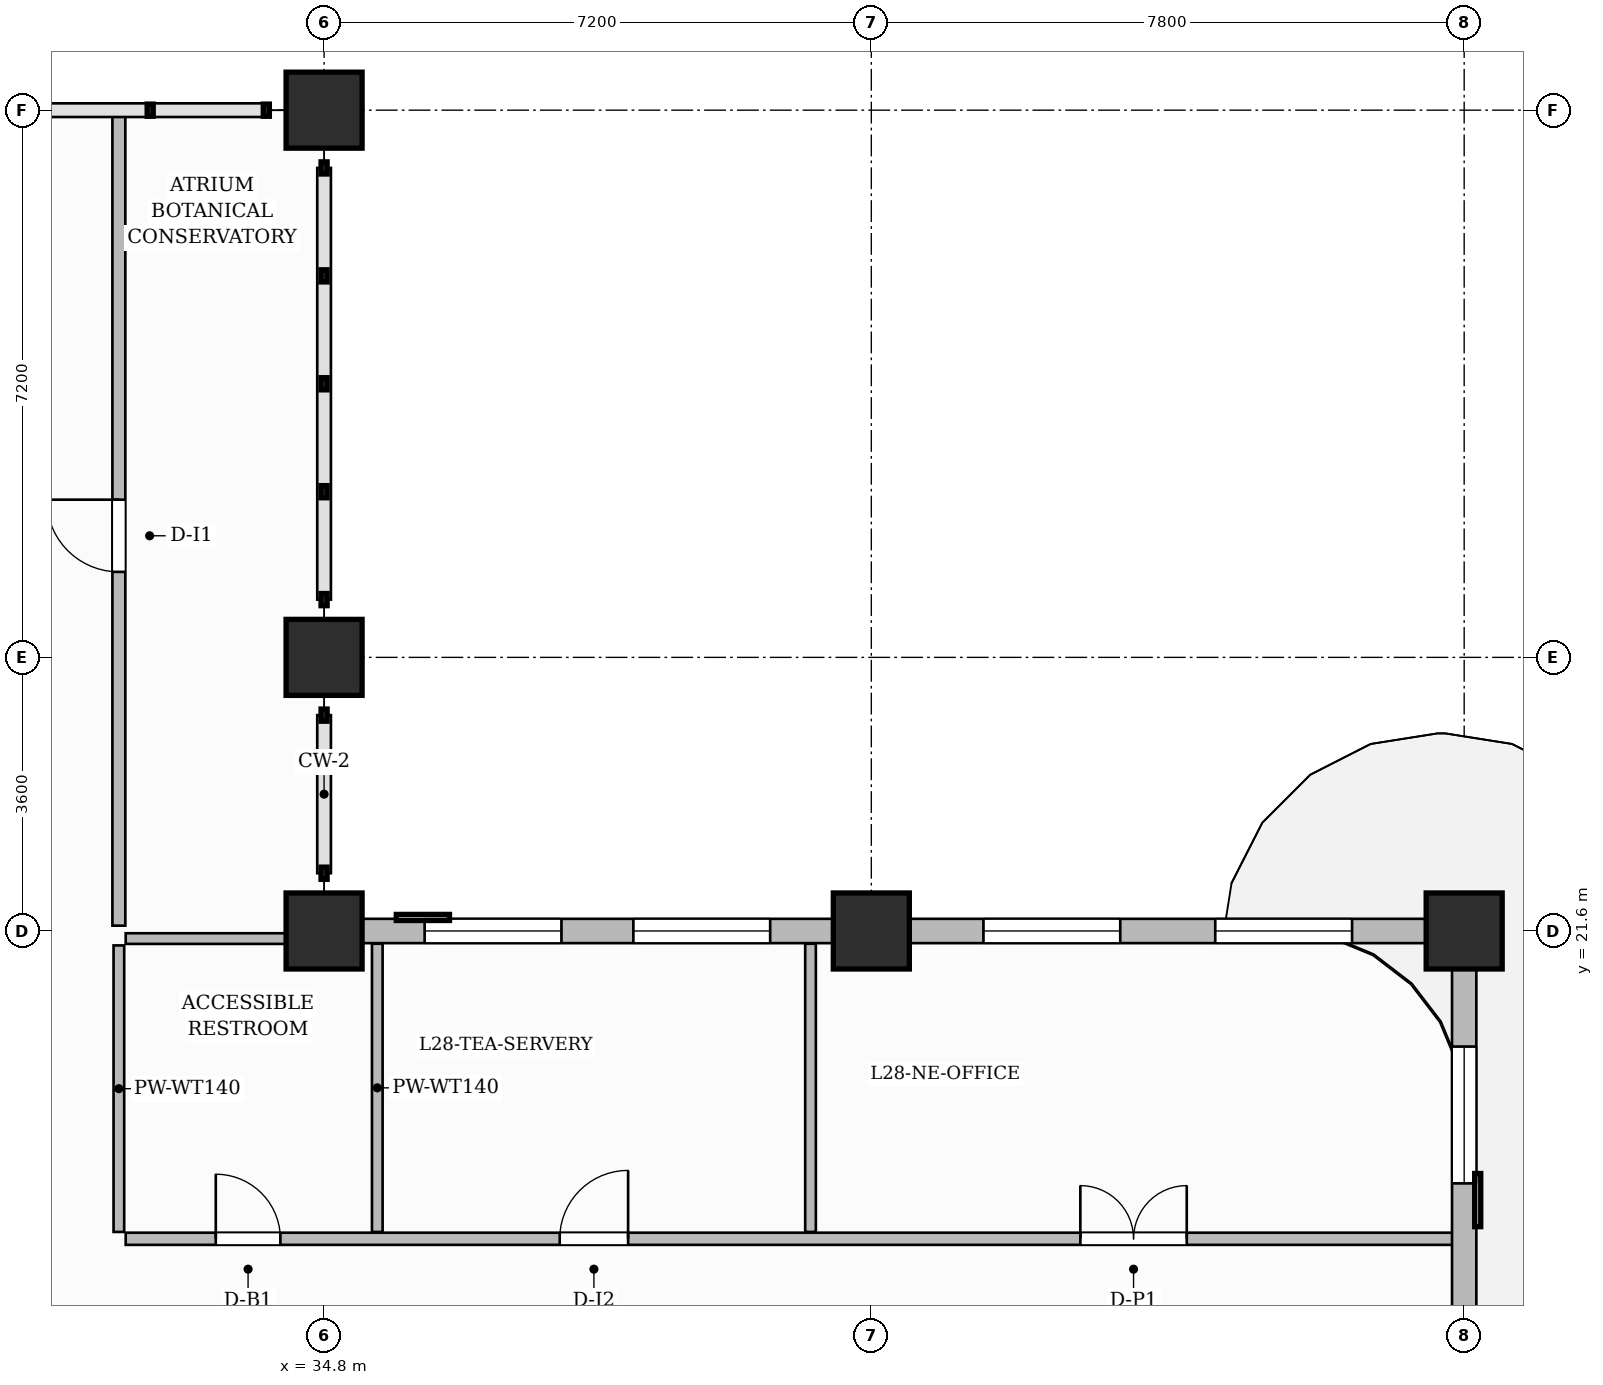
"""IFC4 building model, lengths in metres.
Left out: names, types, materials, properties, quantities, classifications, styles, units other than length and angle.
Written with IfcOpenShell. Run it as: python <this file> out.ifc"""

import sys

from ifc_helpers import new_model, si_unit, direction, frame, frame_2d, origin, origin_2d, place, context, subcontext, project, spatial, rectangle, extrude, source, transform, mapped, element, fill, save


model = new_model("IFC4")
c1 = context("Model", 3, precision=1e-05, world=origin(), true_north=direction((0.0, 1.0)))
c2 = subcontext(c1, "Body", "Model", "MODEL_VIEW")
j1 = project(units=[si_unit("LENGTHUNIT", "METRE"), si_unit("PLANEANGLEUNIT", "RADIAN")], contexts=[c1])
p1 = place(None, origin())
s1 = spatial("IfcSite", under=j1, at=p1, CompositionType="ELEMENT")
p2 = place(p1, origin())
s2 = spatial("IfcBuilding", under=s1, at=p2, CompositionType="ELEMENT")
p3 = place(p2, frame((0.0, 0.0, 115.5)))
s3 = spatial("IfcBuildingStorey", under=s2, at=p3, CompositionType="ELEMENT", Elevation=115.5)
m1 = source(origin(), c2, "Body", "SweptSolid", [
    extrude(rectangle(XDim=1.0, YDim=1.0, at=origin_2d()), origin(), (0.0, 0.0, 1.0), 3.7),
])
for number, where, z_axis, x_axis in (
    (1, (34.8, 21.6, 0.0), (0.0, 0.0, 1.0), (1.0, 0.0, 0.0)),
    (2, (34.8, 25.2, 0.0), (0.0, 0.0, 1.0), (1.0, 0.0, 0.0)),
    (3, (34.8, 32.4, 0.0), (0.0, 0.0, 1.0), (1.0, 0.0, 0.0)),
    (4, (42.0, 21.6, 0.0), (0.0, 0.0, 1.0), (1.0, 0.0, 0.0)),
    (5, (49.8, 21.6, 0.0), (0.0, 0.0, 1.0), (1.0, 0.0, 0.0)),
):
    element("IfcColumn", number, at=place(p3, frame(where, z_axis=z_axis, x_axis=x_axis)), inside=s3, PredefinedType="COLUMN", context=c2, shape_type="MappedRepresentation", body=[
        mapped(m1, transform((0.0, 0.0, 0.0), scale=1.0)),
    ])
p4 = place(p3, frame((32.19, 17.55, 0.0), z_axis=(0.0, 0.0, 1.0), x_axis=(1.0, 0.0, 0.0)))
e6 = element("IfcWall", 6, at=p4, inside=s3, PredefinedType="PARTITIONING", context=c2, shape_type="SweptSolid", body=[
    extrude(rectangle(XDim=17.47, YDim=0.16, at=frame_2d((8.735, 0.0))), origin(), (0.0, 0.0, 1.0), 3.45),
])
p5 = place(p4, frame((1.185, 0.0, 0.0)))
e7 = element("IfcOpeningElement", 7, at=p5, cuts=e6, PredefinedType="OPENING", context=c2, shape_type="SweptSolid", body=[
    extrude(rectangle(XDim=0.85, YDim=2.1, at=frame_2d((0.425, 1.05))), frame((0.0, 0.09, 0.0), z_axis=(0.0, -1.0, 0.0), x_axis=(1.0, 0.0, 0.0)), (0.0, 0.0, 1.0), 0.18),
])
p6 = place(p4, frame((5.71, 0.0, 0.0)))
e8 = element("IfcOpeningElement", 8, at=p6, cuts=e6, PredefinedType="OPENING", context=c2, shape_type="SweptSolid", body=[
    extrude(rectangle(XDim=0.9, YDim=2.15, at=frame_2d((0.45, 1.075))), frame((0.0, 0.09, 0.0), z_axis=(0.0, -1.0, 0.0), x_axis=(1.0, 0.0, 0.0)), (0.0, 0.0, 1.0), 0.18),
])
p7 = place(p4, frame((12.56, 0.0, 0.0)))
e9 = element("IfcOpeningElement", 9, at=p7, cuts=e6, PredefinedType="OPENING", context=c2, shape_type="SweptSolid", body=[
    extrude(rectangle(XDim=1.4, YDim=2.35, at=frame_2d((0.7, 1.175))), frame((0.0, 0.09, 0.0), z_axis=(0.0, -1.0, 0.0), x_axis=(1.0, 0.0, 0.0)), (0.0, 0.0, 1.0), 0.18),
])
p8 = place(p3, frame((32.1, 17.64, 0.0), z_axis=(0.0, 0.0, 1.0), x_axis=(0.0, 1.0, 0.0)))
e10 = element("IfcWall", 10, at=p8, inside=s3, PredefinedType="PARTITIONING", context=c2, shape_type="SweptSolid", body=[
    extrude(rectangle(XDim=3.77, YDim=0.14, at=frame_2d((1.885, 0.0))), origin(), (0.0, 0.0, 1.0), 3.45),
])
for number, where, z_axis, x_axis in (
    (11, (35.5, 17.64, 0.0), (0.0, 0.0, 1.0), (0.0, 1.0, 0.0)),
    (12, (41.2, 17.64, 0.0), (0.0, 0.0, 1.0), (0.0, 1.0, 0.0)),
):
    element("IfcWall", number, at=place(p3, frame(where, z_axis=z_axis, x_axis=x_axis)), inside=s3, PredefinedType="PARTITIONING", context=c2, shape_type="SweptSolid", body=[
        extrude(rectangle(XDim=3.792, YDim=0.14, at=frame_2d((1.896, 0.0))), origin(), (0.0, 0.0, 1.0), 3.45),
    ])
p9 = place(p3, frame((32.19, 21.5, 0.0), z_axis=(0.0, 0.0, 1.0), x_axis=(1.0, 0.0, 0.0)))
e13 = element("IfcWall", 13, at=p9, inside=s3, PredefinedType="PARTITIONING", context=c2, shape_type="SweptSolid", body=[
    extrude(rectangle(XDim=2.42, YDim=0.14, at=frame_2d((1.21, 0.0))), origin(), (0.0, 0.0, 1.0), 2.935),
])
p10 = place(p3, frame((32.1, 21.67, 0.0), z_axis=(0.0, 0.0, 1.0), x_axis=(0.0, 1.0, 0.0)))
e14 = element("IfcWall", 14, at=p10, inside=s3, PredefinedType="PARTITIONING", context=c2, shape_type="SweptSolid", body=[
    extrude(rectangle(XDim=10.702, YDim=0.17, at=frame_2d((5.351, 0.0))), origin(), (0.0, 0.0, 1.0), 3.45),
])
p11 = place(p10, frame((4.655, 0.0, 0.0)))
e15 = element("IfcOpeningElement", 15, at=p11, cuts=e14, PredefinedType="OPENING", context=c2, shape_type="SweptSolid", body=[
    extrude(rectangle(XDim=0.95, YDim=2.15, at=frame_2d((0.475, 1.075))), frame((0.0, 0.095, 0.0), z_axis=(0.0, -1.0, 0.0), x_axis=(1.0, 0.0, 0.0)), (0.0, 0.0, 1.0), 0.19),
])
p12 = place(p3, frame((49.8, 14.62, 0.0), z_axis=(0.0, 0.0, 1.0), x_axis=(0.0, 1.0, 0.0)))
e16 = element("IfcWall", 16, at=p12, inside=s3, PredefinedType="SOLIDWALL", context=c2, shape_type="SweptSolid", body=[
    extrude(rectangle(XDim=6.93, YDim=0.32, at=frame_2d((3.465, 0.0))), origin(), (0.0, 0.0, 1.0), 2.935),
])
p13 = place(p12, frame((0.42, 0.0, 0.0)))
e17 = element("IfcOpeningElement", 17, at=p13, cuts=e16, PredefinedType="OPENING", context=c2, shape_type="SweptSolid", body=[
    extrude(rectangle(XDim=1.2, YDim=2.2, at=frame_2d((0.6, 1.1))), frame((0.0, 0.17, 0.0), z_axis=(0.0, -1.0, 0.0), x_axis=(1.0, 0.0, 0.0)), (0.0, 0.0, 1.0), 0.34),
])
p14 = place(p12, frame((3.659, 0.0, 0.8)))
e18 = element("IfcOpeningElement", 18, at=p14, cuts=e16, PredefinedType="OPENING", context=c2, shape_type="SweptSolid", body=[
    extrude(rectangle(XDim=1.8, YDim=1.85, at=frame_2d((0.9, 0.925))), frame((0.0, 0.17, 0.0), z_axis=(0.0, -1.0, 0.0), x_axis=(1.0, 0.0, 0.0)), (0.0, 0.0, 1.0), 0.34),
])
p15 = place(p3, frame((34.8, 21.6, 0.0), z_axis=(0.0, 0.0, 1.0), x_axis=(1.0, 0.0, 0.0)))
e19 = element("IfcWall", 19, at=p15, inside=s3, PredefinedType="SOLIDWALL", context=c2, shape_type="SweptSolid", body=[
    extrude(rectangle(XDim=15.0, YDim=0.32, at=frame_2d((7.5, 0.0))), origin(), (0.0, 0.0, 1.0), 2.935),
])
p16 = place(p15, frame((1.323, 0.0, 0.8)))
e20 = element("IfcOpeningElement", 20, at=p16, cuts=e19, PredefinedType="OPENING", context=c2, shape_type="SweptSolid", body=[
    extrude(rectangle(XDim=1.8, YDim=1.85, at=frame_2d((0.9, 0.925))), frame((0.0, 0.17, 0.0), z_axis=(0.0, -1.0, 0.0), x_axis=(1.0, 0.0, 0.0)), (0.0, 0.0, 1.0), 0.34),
])
p17 = place(p15, frame((4.069, 0.0, 0.8)))
e21 = element("IfcOpeningElement", 21, at=p17, cuts=e19, PredefinedType="OPENING", context=c2, shape_type="SweptSolid", body=[
    extrude(rectangle(XDim=1.8, YDim=1.85, at=frame_2d((0.9, 0.925))), frame((0.0, 0.17, 0.0), z_axis=(0.0, -1.0, 0.0), x_axis=(1.0, 0.0, 0.0)), (0.0, 0.0, 1.0), 0.34),
])
p18 = place(p15, frame((8.675, 0.0, 0.8)))
e22 = element("IfcOpeningElement", 22, at=p18, cuts=e19, PredefinedType="OPENING", context=c2, shape_type="SweptSolid", body=[
    extrude(rectangle(XDim=1.8, YDim=1.85, at=frame_2d((0.9, 0.925))), frame((0.0, 0.17, 0.0), z_axis=(0.0, -1.0, 0.0), x_axis=(1.0, 0.0, 0.0)), (0.0, 0.0, 1.0), 0.34),
])
p19 = place(p15, frame((11.725, 0.0, 0.8)))
e23 = element("IfcOpeningElement", 23, at=p19, cuts=e19, PredefinedType="OPENING", context=c2, shape_type="SweptSolid", body=[
    extrude(rectangle(XDim=1.8, YDim=1.85, at=frame_2d((0.9, 0.925))), frame((0.0, 0.17, 0.0), z_axis=(0.0, -1.0, 0.0), x_axis=(1.0, 0.0, 0.0)), (0.0, 0.0, 1.0), 0.34),
])
m2 = source(origin(), c2, "Body", "SweptSolid", [
    extrude(rectangle(XDim=0.85, YDim=2.1, at=frame_2d((0.425, 1.05))), frame((0.0, 0.025, 0.0), z_axis=(0.0, -1.0, 0.0), x_axis=(1.0, 0.0, 0.0)), (0.0, 0.0, 1.0), 0.05),
])
p20 = place(p5, origin())
e24 = element("IfcDoor", 24, at=p20, inside=s3, OperationType="SINGLE_SWING_LEFT", PredefinedType="DOOR", context=c2, shape_type="MappedRepresentation", body=[
    mapped(m2, transform((0.0, 0.0, 0.0), scale=1.0)),
])
fill(e7, e24)
m3 = source(origin(), c2, "Body", "SweptSolid", [
    extrude(rectangle(XDim=0.9, YDim=2.15, at=frame_2d((0.45, 1.075))), frame((0.0, 0.025, 0.0), z_axis=(0.0, -1.0, 0.0), x_axis=(1.0, 0.0, 0.0)), (0.0, 0.0, 1.0), 0.05),
])
p21 = place(p6, origin())
e25 = element("IfcDoor", 25, at=p21, inside=s3, OperationType="SINGLE_SWING_RIGHT", PredefinedType="DOOR", context=c2, shape_type="MappedRepresentation", body=[
    mapped(m3, transform((0.0, 0.0, 0.0), scale=1.0)),
])
fill(e8, e25)
m4 = source(origin(), c2, "Body", "SweptSolid", [
    extrude(rectangle(XDim=1.4, YDim=2.35, at=frame_2d((0.7, 1.175))), frame((0.0, 0.025, 0.0), z_axis=(0.0, -1.0, 0.0), x_axis=(1.0, 0.0, 0.0)), (0.0, 0.0, 1.0), 0.05),
])
p22 = place(p7, origin())
e26 = element("IfcDoor", 26, at=p22, inside=s3, OperationType="DOUBLE_DOOR_SINGLE_SWING", PredefinedType="DOOR", context=c2, shape_type="MappedRepresentation", body=[
    mapped(m4, transform((0.0, 0.0, 0.0), scale=1.0)),
])
fill(e9, e26)
m5 = source(origin(), c2, "Body", "SweptSolid", [
    extrude(rectangle(XDim=0.95, YDim=2.15, at=frame_2d((0.475, 1.075))), frame((0.0, 0.025, 0.0), z_axis=(0.0, -1.0, 0.0), x_axis=(1.0, 0.0, 0.0)), (0.0, 0.0, 1.0), 0.05),
])
p23 = place(p11, origin())
e27 = element("IfcDoor", 27, at=p23, inside=s3, OperationType="SINGLE_SWING_RIGHT", PredefinedType="DOOR", context=c2, shape_type="MappedRepresentation", body=[
    mapped(m5, transform((0.0, 0.0, 0.0), scale=1.0)),
])
fill(e15, e27)
m6 = source(origin(), c2, "Body", "SweptSolid", [
    extrude(rectangle(XDim=1.8, YDim=1.85, at=frame_2d((0.9, 0.925))), frame((0.0, 0.03, 0.0), z_axis=(0.0, -1.0, 0.0), x_axis=(1.0, 0.0, 0.0)), (0.0, 0.0, 1.0), 0.06),
])
p24 = place(p14, origin())
e28 = element("IfcWindow", 28, at=p24, inside=s3, PartitioningType="DOUBLE_PANEL_VERTICAL", PredefinedType="WINDOW", context=c2, shape_type="MappedRepresentation", body=[
    mapped(m6, transform((0.0, 0.0, 0.0), scale=1.0)),
])
fill(e18, e28)
p25 = place(p16, origin())
e29 = element("IfcWindow", 29, at=p25, inside=s3, PartitioningType="DOUBLE_PANEL_VERTICAL", PredefinedType="WINDOW", context=c2, shape_type="MappedRepresentation", body=[
    mapped(m6, transform((0.0, 0.0, 0.0), scale=1.0)),
])
fill(e20, e29)
p26 = place(p17, origin())
e30 = element("IfcWindow", 30, at=p26, inside=s3, PartitioningType="DOUBLE_PANEL_VERTICAL", PredefinedType="WINDOW", context=c2, shape_type="MappedRepresentation", body=[
    mapped(m6, transform((0.0, 0.0, 0.0), scale=1.0)),
])
fill(e21, e30)
p27 = place(p18, origin())
e31 = element("IfcWindow", 31, at=p27, inside=s3, PartitioningType="DOUBLE_PANEL_VERTICAL", PredefinedType="WINDOW", context=c2, shape_type="MappedRepresentation", body=[
    mapped(m6, transform((0.0, 0.0, 0.0), scale=1.0)),
])
fill(e22, e31)
p28 = place(p19, origin())
e32 = element("IfcWindow", 32, at=p28, inside=s3, PartitioningType="DOUBLE_PANEL_VERTICAL", PredefinedType="WINDOW", context=c2, shape_type="MappedRepresentation", body=[
    mapped(m6, transform((0.0, 0.0, 0.0), scale=1.0)),
])
fill(e23, e32)
save(model, sys.argv[1])
